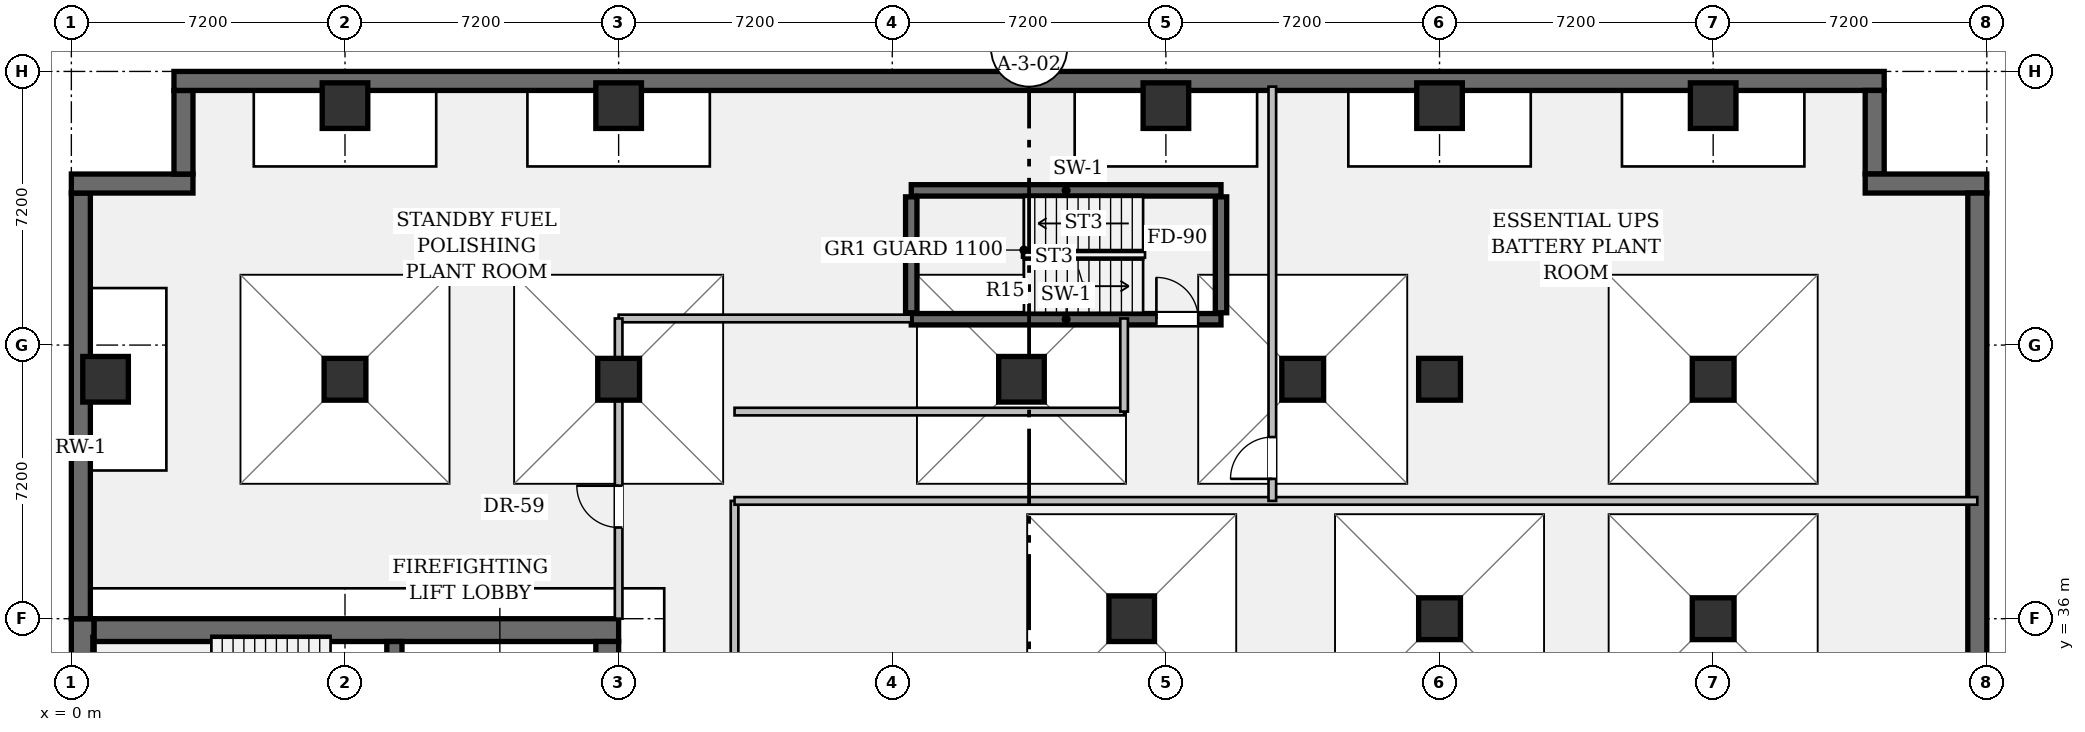
"""IFC4 building model, lengths in metres.
Left out: names, types, materials, properties, quantities, classifications, styles, units other than length and angle.
Written with IfcOpenShell. Run it as: python <this file> out.ifc"""

import sys

from ifc_helpers import new_model, si_unit, direction, frame, frame_2d, origin, origin_2d, place, context, subcontext, project, spatial, rectangle, hollow_rectangle, extrude, element, fill, save


model = new_model("IFC4")
c1 = context("Model", 3, precision=1e-05, world=origin(), true_north=direction((0.0, 1.0)))
c2 = subcontext(c1, "Body", "Model", "MODEL_VIEW")
j1 = project(units=[si_unit("LENGTHUNIT", "METRE"), si_unit("PLANEANGLEUNIT", "RADIAN")], contexts=[c1])
p1 = place(None, origin())
s1 = spatial("IfcSite", under=j1, at=p1, CompositionType="ELEMENT")
p2 = place(p1, origin())
s2 = spatial("IfcBuilding", under=s1, at=p2, CompositionType="ELEMENT")
p3 = place(p2, frame((0.0, 0.0, -9.1)))
s3 = spatial("IfcBuildingStorey", under=s2, at=p3, CompositionType="ELEMENT", Elevation=-9.1)
p4 = place(p3, frame((0.3, 7.2, 0.0), z_axis=(0.0, 0.0, 1.0), x_axis=(0.0, 1.0, 0.0)))
e1 = element("IfcWall", 1, at=p4, inside=s3, PredefinedType="SHEAR", context=c2, shape_type="SweptSolid", body=[
    extrude(rectangle(XDim=28.8, YDim=0.6, at=frame_2d((14.4, 0.0))), origin(), (0.0, 0.0, 1.0), 4.25),
])
p5 = place(p3, frame((0.6, 35.7, 0.0), z_axis=(0.0, 0.0, 1.0), x_axis=(1.0, 0.0, 0.0)))
e2 = element("IfcWall", 2, at=p5, inside=s3, PredefinedType="SHEAR", context=c2, shape_type="SweptSolid", body=[
    extrude(rectangle(XDim=13.8, YDim=0.6, at=frame_2d((6.9, 0.0))), origin(), (0.0, 0.0, 1.0), 4.25),
])
p6 = place(p3, frame((14.1, 35.4, 0.0), z_axis=(0.0, 0.0, 1.0), x_axis=(0.0, -1.0, 0.0)))
e3 = element("IfcWall", 3, at=p6, inside=s3, PredefinedType="SHEAR", context=c2, shape_type="SweptSolid", body=[
    extrude(rectangle(XDim=27.6, YDim=0.6, at=frame_2d((13.8, 0.0))), origin(), (0.0, 0.0, 1.0), 4.25),
])
p7 = place(p6, frame((1.3, 0.0, 0.0)))
e4 = element("IfcOpeningElement", 4, at=p7, cuts=e3, PredefinedType="OPENING", context=c2, shape_type="SweptSolid", body=[
    extrude(rectangle(XDim=1.2, YDim=2.15, at=frame_2d((0.6, 1.075))), frame((0.0, 0.312, 0.0), z_axis=(0.0, -1.0, 0.0), x_axis=(1.0, 0.0, 0.0)), (0.0, 0.0, 1.0), 0.624),
])
p8 = place(p6, frame((25.25, 0.0, 0.0)))
e5 = element("IfcOpeningElement", 5, at=p8, cuts=e3, PredefinedType="OPENING", context=c2, shape_type="SweptSolid", body=[
    extrude(rectangle(XDim=1.2, YDim=2.15, at=frame_2d((0.6, 1.075))), frame((0.0, 0.312, 0.0), z_axis=(0.0, -1.0, 0.0), x_axis=(1.0, 0.0, 0.0)), (0.0, 0.0, 1.0), 0.624),
])
p9 = place(p6, frame((14.6, 0.0, 0.0)))
e6 = element("IfcOpeningElement", 6, at=p9, cuts=e3, PredefinedType="OPENING", context=c2, shape_type="SweptSolid", body=[
    extrude(rectangle(XDim=1.6, YDim=2.2, at=frame_2d((0.8, 1.1))), frame((0.0, 0.312, 0.0), z_axis=(0.0, -1.0, 0.0), x_axis=(1.0, 0.0, 0.0)), (0.0, 0.0, 1.0), 0.624),
])
p10 = place(p3, frame((8.5, 31.72, 0.0), z_axis=(0.0, 0.0, 1.0), x_axis=(0.0, 1.0, 0.0)))
e7 = element("IfcWall", 7, at=p10, inside=s3, PredefinedType="SHEAR", context=c2, shape_type="SweptSolid", body=[
    extrude(rectangle(XDim=3.68, YDim=0.4, at=frame_2d((1.84, 0.0))), origin(), (0.0, 0.0, 1.0), 4.25),
])
p11 = place(p10, frame((0.9, 0.0, 0.0)))
e8 = element("IfcOpeningElement", 8, at=p11, cuts=e7, PredefinedType="OPENING", context=c2, shape_type="SweptSolid", body=[
    extrude(rectangle(XDim=1.1, YDim=2.15, at=frame_2d((0.55, 1.075))), frame((0.0, 0.212, 0.0), z_axis=(0.0, -1.0, 0.0), x_axis=(1.0, 0.0, 0.0)), (0.0, 0.0, 1.0), 0.424),
])
p12 = place(p3, frame((22.1, 43.88, 0.0), z_axis=(0.0, 0.0, 1.0), x_axis=(1.0, 0.0, 0.0)))
e9 = element("IfcWall", 9, at=p12, inside=s3, PredefinedType="SHEAR", context=c2, shape_type="SweptSolid", body=[
    extrude(rectangle(XDim=8.15, YDim=0.3, at=frame_2d((4.075, 0.0))), origin(), (0.0, 0.0, 1.0), 4.25),
])
p13 = place(p12, frame((6.45, 0.0, 0.0)))
e10 = element("IfcOpeningElement", 10, at=p13, cuts=e9, PredefinedType="OPENING", context=c2, shape_type="SweptSolid", body=[
    extrude(rectangle(XDim=1.1, YDim=2.15, at=frame_2d((0.55, 1.075))), frame((0.0, 0.162, 0.0), z_axis=(0.0, -1.0, 0.0), x_axis=(1.0, 0.0, 0.0)), (0.0, 0.0, 1.0), 0.324),
])
p14 = place(p3, frame((22.1, 47.27, 0.0), z_axis=(0.0, 0.0, 1.0), x_axis=(1.0, 0.0, 0.0)))
e11 = element("IfcWall", 11, at=p14, inside=s3, PredefinedType="SHEAR", context=c2, shape_type="SweptSolid", body=[
    extrude(rectangle(XDim=8.15, YDim=0.3, at=frame_2d((4.075, 0.0))), origin(), (0.0, 0.0, 1.0), 4.25),
])
for number, where, z_axis, x_axis in (
    (12, (22.1, 44.05, 0.0), (0.0, 0.0, 1.0), (0.0, 1.0, 0.0)),
    (13, (30.25, 44.05, 0.0), (0.0, 0.0, 1.0), (0.0, 1.0, 0.0)),
):
    element("IfcWall", number, at=place(p3, frame(where, z_axis=z_axis, x_axis=x_axis)), inside=s3, PredefinedType="SHEAR", context=c2, shape_type="SweptSolid", body=[
        extrude(rectangle(XDim=3.05, YDim=0.3, at=frame_2d((1.525, 0.0))), origin(), (0.0, 0.0, 1.0), 4.25),
    ])
p15 = place(p3, frame((0.25, 36.0, 0.0), z_axis=(0.0, 0.0, 1.0), x_axis=(0.0, 1.0, 0.0)))
e14 = element("IfcWall", 14, at=p15, inside=s3, PredefinedType="SOLIDWALL", context=c2, shape_type="SweptSolid", body=[
    extrude(rectangle(XDim=11.2, YDim=0.5, at=frame_2d((5.6, 0.0))), origin(), (0.0, 0.0, 1.0), 4.25),
])
p16 = place(p3, frame((0.0, 47.45, 0.0), z_axis=(0.0, 0.0, 1.0), x_axis=(1.0, 0.0, 0.0)))
e15 = element("IfcWall", 15, at=p16, inside=s3, PredefinedType="SOLIDWALL", context=c2, shape_type="SweptSolid", body=[
    extrude(rectangle(XDim=3.2, YDim=0.5, at=frame_2d((1.6, 0.0))), origin(), (0.0, 0.0, 1.0), 4.25),
])
p17 = place(p3, frame((2.95, 47.7, 0.0), z_axis=(0.0, 0.0, 1.0), x_axis=(0.0, 1.0, 0.0)))
e16 = element("IfcWall", 16, at=p17, inside=s3, PredefinedType="SOLIDWALL", context=c2, shape_type="SweptSolid", body=[
    extrude(rectangle(XDim=2.2, YDim=0.5, at=frame_2d((1.1, 0.0))), origin(), (0.0, 0.0, 1.0), 4.25),
])
p18 = place(p3, frame((2.7, 50.15, 0.0), z_axis=(0.0, 0.0, 1.0), x_axis=(1.0, 0.0, 0.0)))
e17 = element("IfcWall", 17, at=p18, inside=s3, PredefinedType="SOLIDWALL", context=c2, shape_type="SweptSolid", body=[
    extrude(rectangle(XDim=45.0, YDim=0.5, at=frame_2d((22.5, 0.0))), origin(), (0.0, 0.0, 1.0), 4.25),
])
p19 = place(p3, frame((47.45, 49.9, 0.0), z_axis=(0.0, 0.0, 1.0), x_axis=(0.0, -1.0, 0.0)))
e18 = element("IfcWall", 18, at=p19, inside=s3, PredefinedType="SOLIDWALL", context=c2, shape_type="SweptSolid", body=[
    extrude(rectangle(XDim=2.2, YDim=0.5, at=frame_2d((1.1, 0.0))), origin(), (0.0, 0.0, 1.0), 4.25),
])
p20 = place(p3, frame((47.2, 47.45, 0.0), z_axis=(0.0, 0.0, 1.0), x_axis=(1.0, 0.0, 0.0)))
e19 = element("IfcWall", 19, at=p20, inside=s3, PredefinedType="SOLIDWALL", context=c2, shape_type="SweptSolid", body=[
    extrude(rectangle(XDim=3.2, YDim=0.5, at=frame_2d((1.6, 0.0))), origin(), (0.0, 0.0, 1.0), 4.25),
])
p21 = place(p3, frame((50.15, 47.2, 0.0), z_axis=(0.0, 0.0, 1.0), x_axis=(0.0, -1.0, 0.0)))
e20 = element("IfcWall", 20, at=p21, inside=s3, PredefinedType="SOLIDWALL", context=c2, shape_type="SweptSolid", body=[
    extrude(rectangle(XDim=18.4, YDim=0.5, at=frame_2d((9.2, 0.0))), origin(), (0.0, 0.0, 1.0), 4.25),
])
p22 = place(p3, frame((0.9, 42.3, 0.0), z_axis=(0.0, 0.0, 1.0), x_axis=(1.0, 0.0, 0.0)))
e21 = element("IfcColumn", 21, at=p22, inside=s3, PredefinedType="COLUMN", context=c2, shape_type="SweptSolid", body=[
    extrude(hollow_rectangle(XDim=1.2, YDim=1.2, WallThickness=0.075, at=origin_2d()), origin(), (0.0, 0.0, 1.0), 4.25),
])
p23 = place(p3, frame((7.2, 42.3, 0.0), z_axis=(0.0, 0.0, 1.0), x_axis=(1.0, 0.0, 0.0)))
e22 = element("IfcColumn", 22, at=p23, inside=s3, PredefinedType="COLUMN", context=c2, shape_type="SweptSolid", body=[
    extrude(rectangle(XDim=1.1, YDim=1.1, at=origin_2d()), origin(), (0.0, 0.0, 1.0), 4.25),
])
p24 = place(p3, frame((7.2, 49.5, 0.0), z_axis=(0.0, 0.0, 1.0), x_axis=(1.0, 0.0, 0.0)))
e23 = element("IfcColumn", 23, at=p24, inside=s3, PredefinedType="COLUMN", context=c2, shape_type="SweptSolid", body=[
    extrude(hollow_rectangle(XDim=1.2, YDim=1.2, WallThickness=0.075, at=origin_2d()), origin(), (0.0, 0.0, 1.0), 4.25),
])
p25 = place(p3, frame((14.4, 42.3, 0.0), z_axis=(0.0, 0.0, 1.0), x_axis=(1.0, 0.0, 0.0)))
e24 = element("IfcColumn", 24, at=p25, inside=s3, PredefinedType="COLUMN", context=c2, shape_type="SweptSolid", body=[
    extrude(rectangle(XDim=1.1, YDim=1.1, at=origin_2d()), origin(), (0.0, 0.0, 1.0), 4.25),
])
for number, where, z_axis, x_axis in (
    (25, (14.4, 49.5, 0.0), (0.0, 0.0, 1.0), (1.0, 0.0, 0.0)),
    (26, (25.0, 42.3, 0.0), (0.0, 0.0, 1.0), (1.0, 0.0, 0.0)),
    (27, (27.9, 36.0, 0.0), (0.0, 0.0, 1.0), (1.0, 0.0, 0.0)),
    (28, (28.8, 49.5, 0.0), (0.0, 0.0, 1.0), (1.0, 0.0, 0.0)),
):
    element("IfcColumn", number, at=place(p3, frame(where, z_axis=z_axis, x_axis=x_axis)), inside=s3, PredefinedType="COLUMN", context=c2, shape_type="SweptSolid", body=[
        extrude(hollow_rectangle(XDim=1.2, YDim=1.2, WallThickness=0.075, at=origin_2d()), origin(), (0.0, 0.0, 1.0), 4.25),
    ])
for number, where, z_axis, x_axis in (
    (29, (32.4, 42.3, 0.0), (0.0, 0.0, 1.0), (1.0, 0.0, 0.0)),
    (30, (36.0, 36.0, 0.0), (0.0, 0.0, 1.0), (1.0, 0.0, 0.0)),
    (31, (36.0, 42.3, 0.0), (0.0, 0.0, 1.0), (1.0, 0.0, 0.0)),
):
    element("IfcColumn", number, at=place(p3, frame(where, z_axis=z_axis, x_axis=x_axis)), inside=s3, PredefinedType="COLUMN", context=c2, shape_type="SweptSolid", body=[
        extrude(rectangle(XDim=1.1, YDim=1.1, at=origin_2d()), origin(), (0.0, 0.0, 1.0), 4.25),
    ])
p26 = place(p3, frame((36.0, 49.5, 0.0), z_axis=(0.0, 0.0, 1.0), x_axis=(1.0, 0.0, 0.0)))
e32 = element("IfcColumn", 32, at=p26, inside=s3, PredefinedType="COLUMN", context=c2, shape_type="SweptSolid", body=[
    extrude(hollow_rectangle(XDim=1.2, YDim=1.2, WallThickness=0.075, at=origin_2d()), origin(), (0.0, 0.0, 1.0), 4.25),
])
for number, where, z_axis, x_axis in (
    (33, (43.2, 36.0, 0.0), (0.0, 0.0, 1.0), (1.0, 0.0, 0.0)),
    (34, (43.2, 42.3, 0.0), (0.0, 0.0, 1.0), (1.0, 0.0, 0.0)),
):
    element("IfcColumn", number, at=place(p3, frame(where, z_axis=z_axis, x_axis=x_axis)), inside=s3, PredefinedType="COLUMN", context=c2, shape_type="SweptSolid", body=[
        extrude(rectangle(XDim=1.1, YDim=1.1, at=origin_2d()), origin(), (0.0, 0.0, 1.0), 4.25),
    ])
p27 = place(p3, frame((43.2, 49.5, 0.0), z_axis=(0.0, 0.0, 1.0), x_axis=(1.0, 0.0, 0.0)))
e35 = element("IfcColumn", 35, at=p27, inside=s3, PredefinedType="COLUMN", context=c2, shape_type="SweptSolid", body=[
    extrude(hollow_rectangle(XDim=1.2, YDim=1.2, WallThickness=0.075, at=origin_2d()), origin(), (0.0, 0.0, 1.0), 4.25),
])
p28 = place(p3, frame((17.45, 17.55, 0.0), z_axis=(0.0, 0.0, 1.0), x_axis=(0.0, 1.0, 0.0)))
e36 = element("IfcWall", 36, at=p28, inside=s3, PredefinedType="PARTITIONING", context=c2, shape_type="SweptSolid", body=[
    extrude(rectangle(XDim=21.55, YDim=0.2, at=frame_2d((10.775, 0.0))), origin(), (0.0, 0.0, 1.0), 3.288),
])
p29 = place(p3, frame((14.4, 43.9, 0.0), z_axis=(0.0, 0.0, 1.0), x_axis=(1.0, 0.0, 0.0)))
e37 = element("IfcWall", 37, at=p29, inside=s3, PredefinedType="PARTITIONING", context=c2, shape_type="SweptSolid", body=[
    extrude(rectangle(XDim=7.7, YDim=0.2, at=frame_2d((3.85, 0.0))), origin(), (0.0, 0.0, 1.0), 3.288),
])
p30 = place(p3, frame((17.45, 41.45, 0.0), z_axis=(0.0, 0.0, 1.0), x_axis=(1.0, 0.0, 0.0)))
e38 = element("IfcWall", 38, at=p30, inside=s3, PredefinedType="PARTITIONING", context=c2, shape_type="SweptSolid", body=[
    extrude(rectangle(XDim=10.25, YDim=0.2, at=frame_2d((5.125, 0.0))), origin(), (0.0, 0.0, 1.0), 3.686),
])
p31 = place(p3, frame((17.45, 39.1, 0.0), z_axis=(0.0, 0.0, 1.0), x_axis=(1.0, 0.0, 0.0)))
e39 = element("IfcWall", 39, at=p31, inside=s3, PredefinedType="PARTITIONING", context=c2, shape_type="SweptSolid", body=[
    extrude(rectangle(XDim=32.7, YDim=0.2, at=frame_2d((16.35, 0.0))), origin(), (0.0, 0.0, 1.0), 3.288),
])
p32 = place(p3, frame((27.7, 41.45, 0.0), z_axis=(0.0, 0.0, 1.0), x_axis=(0.0, 1.0, 0.0)))
e40 = element("IfcWall", 40, at=p32, inside=s3, PredefinedType="PARTITIONING", context=c2, shape_type="SweptSolid", body=[
    extrude(rectangle(XDim=2.45, YDim=0.2, at=frame_2d((1.225, 0.0))), origin(), (0.0, 0.0, 1.0), 3.288),
])
p33 = place(p3, frame((31.6, 39.1, 0.0), z_axis=(0.0, 0.0, 1.0), x_axis=(0.0, 1.0, 0.0)))
e41 = element("IfcWall", 41, at=p33, inside=s3, PredefinedType="PARTITIONING", context=c2, shape_type="SweptSolid", body=[
    extrude(rectangle(XDim=10.9, YDim=0.2, at=frame_2d((5.45, 0.0))), origin(), (0.0, 0.0, 1.0), 3.288),
])
p34 = place(p33, frame((0.58, 0.0, 0.0)))
e42 = element("IfcOpeningElement", 42, at=p34, cuts=e41, PredefinedType="OPENING", context=c2, shape_type="SweptSolid", body=[
    extrude(rectangle(XDim=1.1, YDim=2.15, at=frame_2d((0.55, 1.075))), frame((0.0, 0.112, 0.0), z_axis=(0.0, -1.0, 0.0), x_axis=(1.0, 0.0, 0.0)), (0.0, 0.0, 1.0), 0.224),
])
p35 = place(p3, frame((14.4, 36.0, 0.0), z_axis=(0.0, 0.0, 1.0), x_axis=(0.0, 1.0, 0.0)))
e43 = element("IfcWall", 43, at=p35, inside=s3, PredefinedType="PARTITIONING", context=c2, shape_type="SweptSolid", body=[
    extrude(rectangle(XDim=7.9, YDim=0.2, at=frame_2d((3.95, 0.0))), origin(), (0.0, 0.0, 1.0), 3.288),
])
p36 = place(p35, frame((2.4, 0.0, 0.0)))
e44 = element("IfcOpeningElement", 44, at=p36, cuts=e43, PredefinedType="OPENING", context=c2, shape_type="SweptSolid", body=[
    extrude(rectangle(XDim=1.1, YDim=2.15, at=frame_2d((0.55, 1.075))), frame((0.0, 0.112, 0.0), z_axis=(0.0, -1.0, 0.0), x_axis=(1.0, 0.0, 0.0)), (0.0, 0.0, 1.0), 0.224),
])
p37 = place(p13, origin())
e45 = element("IfcDoor", 45, at=p37, inside=s3, OperationType="SINGLE_SWING_LEFT", PredefinedType="DOOR", context=c2, shape_type="SweptSolid", body=[
    extrude(rectangle(XDim=1.1, YDim=2.15, at=frame_2d((0.55, 1.075))), frame((0.0, 0.025, 0.0), z_axis=(0.0, -1.0, 0.0), x_axis=(1.0, 0.0, 0.0)), (0.0, 0.0, 1.0), 0.05),
])
fill(e10, e45)
p38 = place(p36, origin())
e46 = element("IfcDoor", 46, at=p38, inside=s3, OperationType="SINGLE_SWING_RIGHT", PredefinedType="DOOR", context=c2, shape_type="SweptSolid", body=[
    extrude(rectangle(XDim=1.1, YDim=2.15, at=frame_2d((0.55, 1.075))), frame((0.0, 0.025, 0.0), z_axis=(0.0, -1.0, 0.0), x_axis=(1.0, 0.0, 0.0)), (0.0, 0.0, 1.0), 0.05),
])
fill(e44, e46)
p39 = place(p34, origin())
e47 = element("IfcDoor", 47, at=p39, inside=s3, OperationType="SINGLE_SWING_LEFT", PredefinedType="DOOR", context=c2, shape_type="SweptSolid", body=[
    extrude(rectangle(XDim=1.1, YDim=2.15, at=frame_2d((0.55, 1.075))), frame((0.0, 0.025, 0.0), z_axis=(0.0, -1.0, 0.0), x_axis=(1.0, 0.0, 0.0)), (0.0, 0.0, 1.0), 0.05),
])
fill(e42, e47)
save(model, sys.argv[1])
